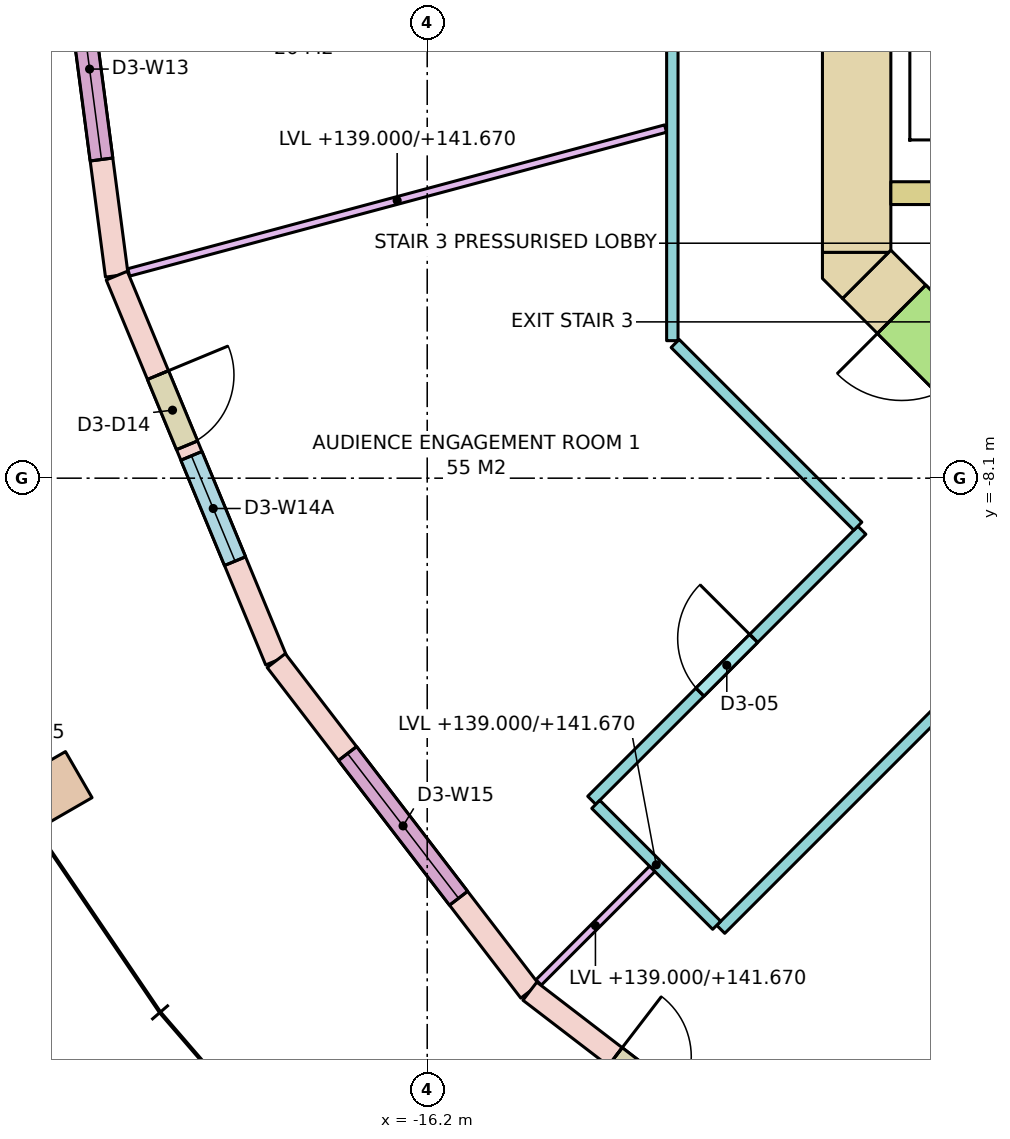
"""IFC4 building model, lengths in metres.
Left out: names, types, materials, properties, quantities, classifications, styles, units other than length and angle.
Written with IfcOpenShell. Run it as: python <this file> out.ifc"""

import sys

from ifc_helpers import new_model, si_unit, direction, frame, frame_2d, origin, origin_2d, place, context, subcontext, project, spatial, polyline, rectangle, outline, extrude, element, fill, save


model = new_model("IFC4")
c1 = context("Model", 3, precision=1e-05, world=origin(), true_north=direction((0.0, 1.0)))
c2 = subcontext(c1, "Body", "Model", "MODEL_VIEW")
j1 = project(units=[si_unit("LENGTHUNIT", "METRE"), si_unit("PLANEANGLEUNIT", "RADIAN")], contexts=[c1])
p1 = place(None, origin())
s1 = spatial("IfcSite", under=j1, at=p1, CompositionType="ELEMENT")
p2 = place(p1, origin())
s2 = spatial("IfcBuilding", under=s1, at=p2, CompositionType="ELEMENT")
p3 = place(p2, frame((0.0, 0.0, 139.0)))
s3 = spatial("IfcBuildingStorey", under=s2, at=p3, CompositionType="ELEMENT", Elevation=139.0)
p4 = place(p3, frame((-21.218, -12.25, 0.0), z_axis=(0.0, 0.0, 1.0), x_axis=(0.5, -0.866025403784, 0.0)))
e1 = element("IfcColumn", 1, at=p4, inside=s3, PredefinedType="COLUMN", context=c2, shape_type="SweptSolid", body=[
    extrude(rectangle(XDim=0.7, YDim=1.0, at=origin_2d()), origin(), (0.0, 0.0, 1.0), 3.8),
])
p5 = place(p3, frame((-10.55, -5.13, -0.28), z_axis=(0.0, 0.0, 1.0), x_axis=(0.0, 1.0, 0.0)))
e2 = element("IfcWall", 2, at=p5, inside=s3, PredefinedType="SHEAR", context=c2, shape_type="SweptSolid", body=[
    extrude(rectangle(XDim=10.26, YDim=0.9, at=frame_2d((5.13, 0.0))), origin(), (0.0, 0.0, 1.0), 3.8),
])
p6 = place(p5, frame((4.13, 0.0, 0.28)))
e3 = element("IfcOpeningElement", 3, at=p6, cuts=e2, PredefinedType="OPENING", context=c2, shape_type="SweptSolid", body=[
    extrude(rectangle(XDim=2.0, YDim=2.1, at=frame_2d((1.0, 1.05))), frame((0.0, 0.46, 0.0), z_axis=(0.0, -1.0, 0.0), x_axis=(1.0, 0.0, 0.0)), (0.0, 0.0, 1.0), 0.92),
])
p7 = place(p3, frame((-7.418, -8.418, -0.28), z_axis=(0.0, 0.0, 1.0), x_axis=(-0.707106781187, 0.707106781187, 0.0)))
e4 = element("IfcWall", 4, at=p7, inside=s3, PredefinedType="SHEAR", context=c2, shape_type="SweptSolid", body=[
    extrude(rectangle(XDim=4.243, YDim=0.9, at=frame_2d((2.121, 0.0))), origin(), (0.0, 0.0, 1.0), 3.8),
])
p8 = place(p7, frame((2.393, 0.0, 0.28)))
e5 = element("IfcOpeningElement", 5, at=p8, cuts=e4, PredefinedType="OPENING", context=c2, shape_type="SweptSolid", body=[
    extrude(rectangle(XDim=1.2, YDim=2.1, at=frame_2d((0.6, 1.05))), frame((0.0, 0.46, 0.0), z_axis=(0.0, -1.0, 0.0), x_axis=(1.0, 0.0, 0.0)), (0.0, 0.0, 1.0), 0.92),
])
p9 = place(p3, frame((0.0, 0.0, -0.28)))
e6 = element("IfcWall", 6, at=p9, inside=s3, PredefinedType="SHEAR", context=c2, shape_type="SweptSolid", body=[
    extrude(outline(polyline([(-11.0, -5.473), (-11.0, -5.13), (-10.13, -5.13), (-10.736, -5.736), (-11.0, -5.473)])), origin(), (0.0, 0.0, 1.0), 3.8),
])
p10 = place(p3, frame((-10.1, -4.35, 0.0), z_axis=(0.0, 0.0, 1.0), x_axis=(1.0, 0.0, 0.0)))
e7 = element("IfcWall", 7, at=p10, inside=s3, PredefinedType="SOLIDWALL", context=c2, shape_type="SweptSolid", body=[
    extrude(rectangle(XDim=8.1, YDim=0.3, at=frame_2d((4.05, 0.0))), origin(), (0.0, 0.0, 1.0), 3.52),
])
p11 = place(p3, frame((-21.0, 0.0, 0.0), z_axis=(0.0, 0.0, 1.0), x_axis=(0.130527087244, -0.991444743541, 0.0)))
e8 = element("IfcWall", 8, at=p11, inside=s3, PredefinedType="STANDARD", context=c2, shape_type="SweptSolid", body=[
    extrude(rectangle(XDim=5.482, YDim=0.3, at=frame_2d((2.741, 0.0))), origin(), (0.0, 0.0, 1.0), 3.52),
])
p12 = place(p11, frame((1.541, 0.0, 0.8)))
e9 = element("IfcOpeningElement", 9, at=p12, cuts=e8, PredefinedType="OPENING", context=c2, shape_type="SweptSolid", body=[
    extrude(rectangle(XDim=2.4, YDim=2.5, at=frame_2d((1.2, 1.25))), frame((0.0, 0.16, 0.0), z_axis=(0.0, -1.0, 0.0), x_axis=(1.0, 0.0, 0.0)), (0.0, 0.0, 1.0), 0.32),
])
p13 = place(p3, frame((-20.284, -5.435, 0.0), z_axis=(0.0, 0.0, 1.0), x_axis=(0.382688740813, -0.923877333662, 0.0)))
e10 = element("IfcWall", 10, at=p13, inside=s3, PredefinedType="STANDARD", context=c2, shape_type="SweptSolid", body=[
    extrude(rectangle(XDim=5.482, YDim=0.3, at=frame_2d((2.741, 0.0))), origin(), (0.0, 0.0, 1.0), 3.52),
])
p14 = place(p13, frame((1.416, 0.0, 0.0)))
e11 = element("IfcOpeningElement", 11, at=p14, cuts=e10, PredefinedType="OPENING", context=c2, shape_type="SweptSolid", body=[
    extrude(rectangle(XDim=1.0, YDim=2.4, at=frame_2d((0.5, 1.2))), frame((0.0, 0.16, 0.0), z_axis=(0.0, -1.0, 0.0), x_axis=(1.0, 0.0, 0.0)), (0.0, 0.0, 1.0), 0.32),
])
p15 = place(p13, frame((2.566, 0.0, 0.8)))
e12 = element("IfcOpeningElement", 12, at=p15, cuts=e10, PredefinedType="OPENING", context=c2, shape_type="SweptSolid", body=[
    extrude(rectangle(XDim=1.5, YDim=2.5, at=frame_2d((0.75, 1.25))), frame((0.0, 0.16, 0.0), z_axis=(0.0, -1.0, 0.0), x_axis=(1.0, 0.0, 0.0)), (0.0, 0.0, 1.0), 0.32),
])
p16 = place(p3, frame((-18.187, -10.5, 0.0), z_axis=(0.0, 0.0, 1.0), x_axis=(0.608784891166, -0.793335336593, 0.0)))
e13 = element("IfcWall", 13, at=p16, inside=s3, PredefinedType="STANDARD", context=c2, shape_type="SweptSolid", body=[
    extrude(rectangle(XDim=5.482, YDim=0.3, at=frame_2d((2.741, 0.0))), origin(), (0.0, 0.0, 1.0), 3.52),
])
p17 = place(p16, frame((1.541, 0.0, 0.8)))
e14 = element("IfcOpeningElement", 14, at=p17, cuts=e13, PredefinedType="OPENING", context=c2, shape_type="SweptSolid", body=[
    extrude(rectangle(XDim=2.4, YDim=2.5, at=frame_2d((1.2, 1.25))), frame((0.0, 0.16, 0.0), z_axis=(0.0, -1.0, 0.0), x_axis=(1.0, 0.0, 0.0)), (0.0, 0.0, 1.0), 0.32),
])
p18 = place(p3, frame((-14.849, -14.849, 0.0), z_axis=(0.0, 0.0, 1.0), x_axis=(0.793335336593, -0.608784891166, 0.0)))
e15 = element("IfcWall", 15, at=p18, inside=s3, PredefinedType="STANDARD", context=c2, shape_type="SweptSolid", body=[
    extrude(rectangle(XDim=5.482, YDim=0.3, at=frame_2d((2.741, 0.0))), origin(), (0.0, 0.0, 1.0), 3.52),
])
p19 = place(p18, frame((1.416, 0.0, 0.0)))
e16 = element("IfcOpeningElement", 16, at=p19, cuts=e15, PredefinedType="OPENING", context=c2, shape_type="SweptSolid", body=[
    extrude(rectangle(XDim=1.0, YDim=2.4, at=frame_2d((0.5, 1.2))), frame((0.0, 0.16, 0.0), z_axis=(0.0, -1.0, 0.0), x_axis=(1.0, 0.0, 0.0)), (0.0, 0.0, 1.0), 0.32),
])
p20 = place(p18, frame((2.566, 0.0, 0.8)))
e17 = element("IfcOpeningElement", 17, at=p20, cuts=e15, PredefinedType="OPENING", context=c2, shape_type="SweptSolid", body=[
    extrude(rectangle(XDim=1.5, YDim=2.5, at=frame_2d((0.75, 1.25))), frame((0.0, 0.16, 0.0), z_axis=(0.0, -1.0, 0.0), x_axis=(1.0, 0.0, 0.0)), (0.0, 0.0, 1.0), 0.32),
])
p21 = place(p3, frame((-14.035, -12.338, 0.0), z_axis=(0.0, 0.0, 1.0), x_axis=(0.707106781187, 0.707106781187, 0.0)))
e18 = element("IfcWall", 18, at=p21, inside=s3, PredefinedType="PARTITIONING", context=c2, shape_type="SweptSolid", body=[
    extrude(rectangle(XDim=5.026, YDim=0.15, at=frame_2d((2.513, 0.0))), origin(), (0.0, 0.0, 1.0), 3.52),
])
p22 = place(p21, frame((2.013, 0.0, 0.0)))
e19 = element("IfcOpeningElement", 19, at=p22, cuts=e18, PredefinedType="OPENING", context=c2, shape_type="SweptSolid", body=[
    extrude(rectangle(XDim=1.0, YDim=2.1, at=frame_2d((0.5, 1.05))), frame((0.0, 0.085, 0.0), z_axis=(0.0, -1.0, 0.0), x_axis=(1.0, 0.0, 0.0)), (0.0, 0.0, 1.0), 0.17),
])
p23 = place(p3, frame((-10.534, -8.731, 0.0), z_axis=(0.0, 0.0, 1.0), x_axis=(-0.707106781187, 0.707106781187, 0.0)))
e20 = element("IfcWall", 20, at=p23, inside=s3, PredefinedType="PARTITIONING", context=c2, shape_type="SweptSolid", body=[
    extrude(rectangle(XDim=3.399, YDim=0.15, at=frame_2d((1.7, 0.0))), origin(), (0.0, 0.0, 1.0), 2.67),
])
p24 = place(p3, frame((-12.975, -6.291, 0.0), z_axis=(0.0, 0.0, 1.0), x_axis=(0.0, 1.0, 0.0)))
e21 = element("IfcWall", 21, at=p24, inside=s3, PredefinedType="PARTITIONING", context=c2, shape_type="SweptSolid", body=[
    extrude(rectangle(XDim=5.016, YDim=0.15, at=frame_2d((2.508, 0.0))), origin(), (0.0, 0.0, 1.0), 2.67),
])
p25 = place(p3, frame((-8.784, -10.481, 0.0), z_axis=(0.0, 0.0, 1.0), x_axis=(-0.707106781187, -0.707106781187, 0.0)))
e22 = element("IfcWall", 22, at=p25, inside=s3, PredefinedType="PARTITIONING", context=c2, shape_type="SweptSolid", body=[
    extrude(rectangle(XDim=5.026, YDim=0.15, at=frame_2d((2.513, 0.0))), origin(), (0.0, 0.0, 1.0), 3.52),
])
p26 = place(p3, frame((-12.391, -13.982, 0.0), z_axis=(0.0, 0.0, 1.0), x_axis=(-0.707106781187, 0.707106781187, 0.0)))
e23 = element("IfcWall", 23, at=p26, inside=s3, PredefinedType="PARTITIONING", context=c2, shape_type="SweptSolid", body=[
    extrude(rectangle(XDim=2.25, YDim=0.15, at=frame_2d((1.125, 0.0))), origin(), (0.0, 0.0, 1.0), 2.67),
])
p27 = place(p3, frame((-13.064, -3.5, 0.0), z_axis=(0.0, 0.0, 1.0), x_axis=(-0.965927781613, -0.258811747624, 0.0)))
e24 = element("IfcWall", 24, at=p27, inside=s3, PredefinedType="PARTITIONING", context=c2, shape_type="SweptSolid", body=[
    extrude(rectangle(XDim=7.312, YDim=0.1, at=frame_2d((3.656, 0.0))), origin(), (0.0, 0.0, 1.0), 2.67),
])
p28 = place(p3, frame((-13.24, -13.24, 0.0), z_axis=(0.0, 0.0, 1.0), x_axis=(-0.707106781187, -0.707106781187, 0.0)))
e25 = element("IfcWall", 25, at=p28, inside=s3, PredefinedType="PARTITIONING", context=c2, shape_type="SweptSolid", body=[
    extrude(rectangle(XDim=2.113, YDim=0.1, at=frame_2d((1.057, 0.0))), origin(), (0.0, 0.0, 1.0), 2.67),
])
p29 = place(p12, origin())
e26 = element("IfcWindow", 26, at=p29, inside=s3, PartitioningType="SINGLE_PANEL", PredefinedType="WINDOW", context=c2, shape_type="SweptSolid", body=[
    extrude(rectangle(XDim=2.4, YDim=2.5, at=frame_2d((1.2, 1.25))), frame((0.0, 0.03, 0.0), z_axis=(0.0, -1.0, 0.0), x_axis=(1.0, 0.0, 0.0)), (0.0, 0.0, 1.0), 0.06),
])
fill(e9, e26)
p30 = place(p14, origin())
e27 = element("IfcDoor", 27, at=p30, inside=s3, OperationType="SINGLE_SWING_LEFT", PredefinedType="DOOR", context=c2, shape_type="SweptSolid", body=[
    extrude(rectangle(XDim=1.0, YDim=2.4, at=frame_2d((0.5, 1.2))), frame((0.0, 0.025, 0.0), z_axis=(0.0, -1.0, 0.0), x_axis=(1.0, 0.0, 0.0)), (0.0, 0.0, 1.0), 0.05),
])
fill(e11, e27)
p31 = place(p15, origin())
e28 = element("IfcWindow", 28, at=p31, inside=s3, PartitioningType="SINGLE_PANEL", PredefinedType="WINDOW", context=c2, shape_type="SweptSolid", body=[
    extrude(rectangle(XDim=1.5, YDim=2.5, at=frame_2d((0.75, 1.25))), frame((0.0, 0.03, 0.0), z_axis=(0.0, -1.0, 0.0), x_axis=(1.0, 0.0, 0.0)), (0.0, 0.0, 1.0), 0.06),
])
fill(e12, e28)
p32 = place(p17, origin())
e29 = element("IfcWindow", 29, at=p32, inside=s3, PartitioningType="SINGLE_PANEL", PredefinedType="WINDOW", context=c2, shape_type="SweptSolid", body=[
    extrude(rectangle(XDim=2.4, YDim=2.5, at=frame_2d((1.2, 1.25))), frame((0.0, 0.03, 0.0), z_axis=(0.0, -1.0, 0.0), x_axis=(1.0, 0.0, 0.0)), (0.0, 0.0, 1.0), 0.06),
])
fill(e14, e29)
p33 = place(p19, origin())
e30 = element("IfcDoor", 30, at=p33, inside=s3, OperationType="SINGLE_SWING_LEFT", PredefinedType="DOOR", context=c2, shape_type="SweptSolid", body=[
    extrude(rectangle(XDim=1.0, YDim=2.4, at=frame_2d((0.5, 1.2))), frame((0.0, 0.025, 0.0), z_axis=(0.0, -1.0, 0.0), x_axis=(1.0, 0.0, 0.0)), (0.0, 0.0, 1.0), 0.05),
])
fill(e16, e30)
p34 = place(p8, origin())
e31 = element("IfcDoor", 31, at=p34, inside=s3, OperationType="SINGLE_SWING_RIGHT", PredefinedType="DOOR", context=c2, shape_type="SweptSolid", body=[
    extrude(rectangle(XDim=1.2, YDim=2.1, at=frame_2d((0.6, 1.05))), frame((0.0, 0.025, 0.0), z_axis=(0.0, -1.0, 0.0), x_axis=(1.0, 0.0, 0.0)), (0.0, 0.0, 1.0), 0.05),
])
fill(e5, e31)
p35 = place(p22, origin())
e32 = element("IfcDoor", 32, at=p35, inside=s3, OperationType="SINGLE_SWING_RIGHT", PredefinedType="DOOR", context=c2, shape_type="SweptSolid", body=[
    extrude(rectangle(XDim=1.0, YDim=2.1, at=frame_2d((0.5, 1.05))), frame((0.0, 0.025, 0.0), z_axis=(0.0, -1.0, 0.0), x_axis=(1.0, 0.0, 0.0)), (0.0, 0.0, 1.0), 0.05),
])
fill(e19, e32)
save(model, sys.argv[1])
